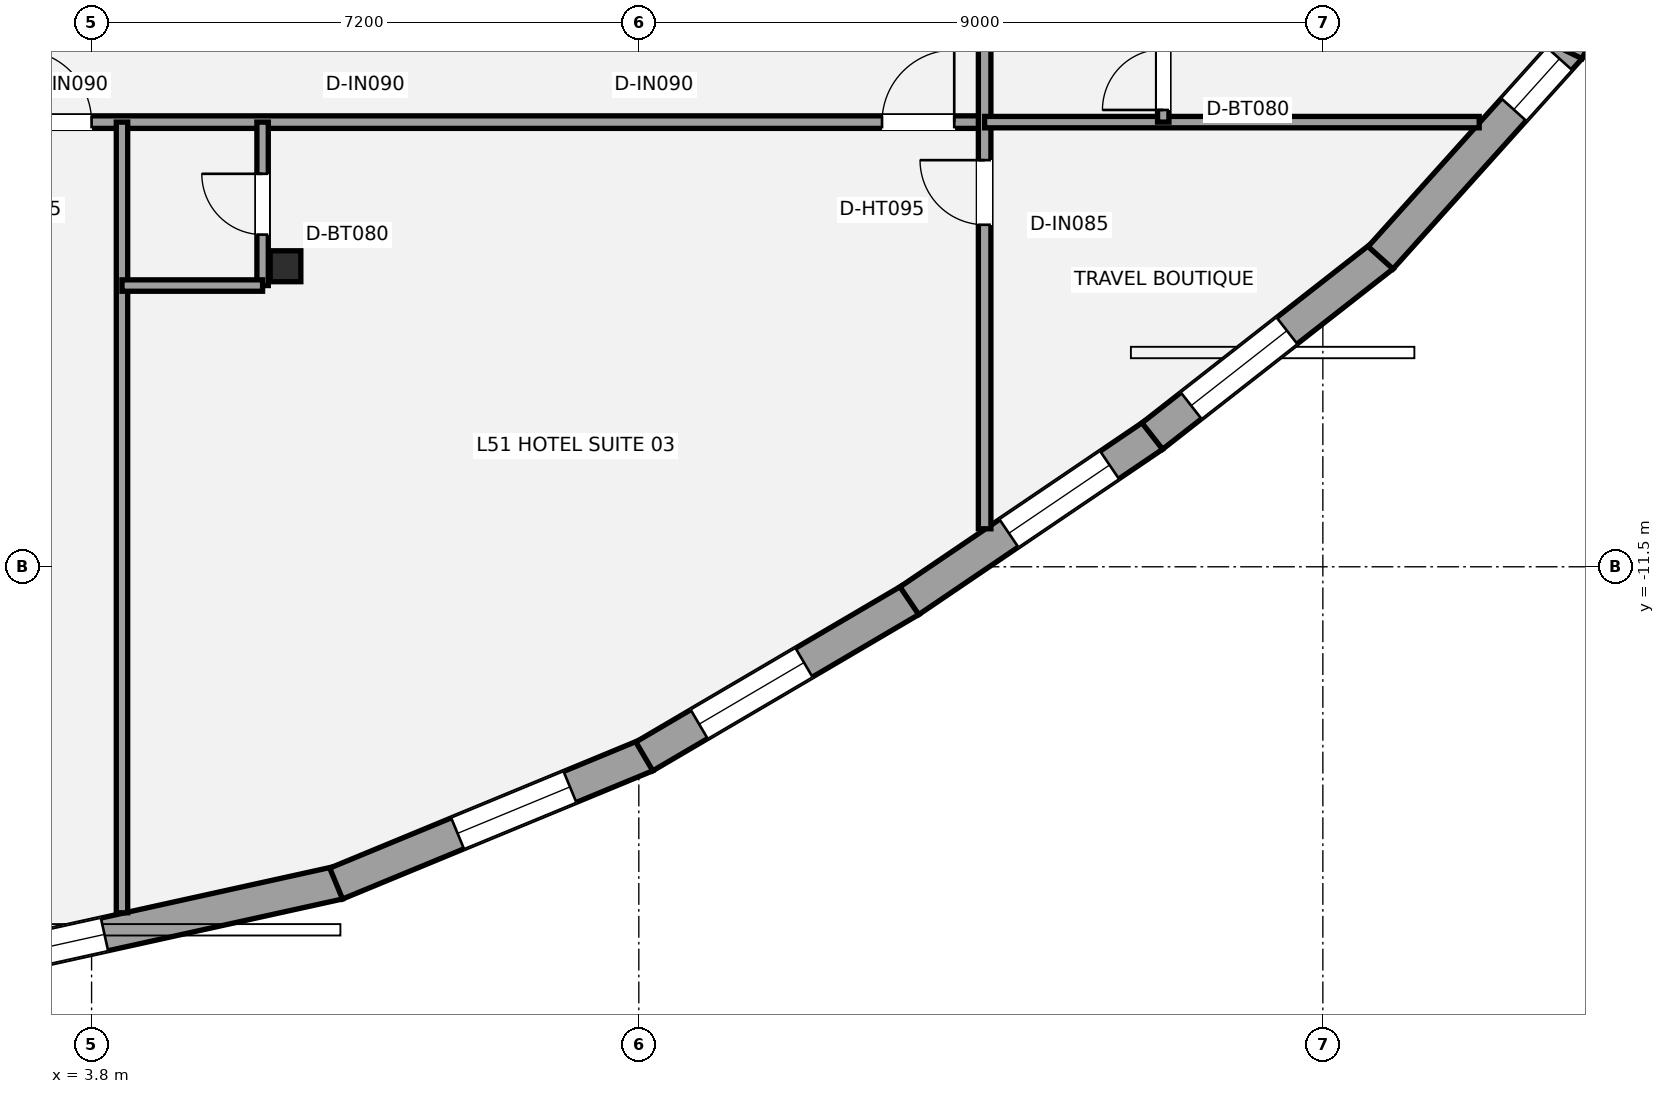
"""IFC4 building model, lengths in metres.
Left out: names, types, materials, properties, quantities, classifications, styles, units other than length and angle.
Written with IfcOpenShell. Run it as: python <this file> out.ifc"""

import sys

from ifc_helpers import new_model, si_unit, direction, frame, frame_2d, origin, origin_2d, place, context, subcontext, project, spatial, rectangle, i_section, extrude, element, fill, save


model = new_model("IFC4")
c1 = context("Model", 3, precision=1e-05, world=origin(), true_north=direction((0.0, 1.0)))
c2 = subcontext(c1, "Body", "Model", "MODEL_VIEW")
j1 = project(units=[si_unit("LENGTHUNIT", "METRE"), si_unit("PLANEANGLEUNIT", "RADIAN")], contexts=[c1])
p1 = place(None, origin())
s1 = spatial("IfcSite", under=j1, at=p1, CompositionType="ELEMENT")
p2 = place(p1, origin())
s2 = spatial("IfcBuilding", under=s1, at=p2, CompositionType="ELEMENT")
p3 = place(p2, frame((0.0, 0.0, 185.4)))
s3 = spatial("IfcBuildingStorey", under=s2, at=p3, CompositionType="ELEMENT", Elevation=185.4)
p4 = place(p3, frame((6.351, -7.546, 0.0), z_axis=(0.0, 0.0, 1.0), x_axis=(1.0, 0.0, 0.0)))
e1 = element("IfcColumn", 1, at=p4, inside=s3, PredefinedType="COLUMN", context=c2, shape_type="SweptSolid", body=[
    extrude(i_section(OverallWidth=0.404, OverallDepth=0.407, WebThickness=0.027, FlangeThickness=0.044, at=origin_2d()), origin(), (0.0, 0.0, 1.0), 3.2),
])
p5 = place(p3, frame((7.054, -15.656, 0.0), z_axis=(0.0, 0.0, 1.0), x_axis=(-0.976520281828, -0.215425484049, 0.0)))
e2 = element("IfcWall", 2, at=p5, inside=s3, PredefinedType="STANDARD", context=c2, shape_type="SweptSolid", body=[
    extrude(rectangle(XDim=4.759, YDim=0.44, at=frame_2d((2.379, 0.0))), origin(), (0.0, 0.0, 1.0), 2.315),
])
p6 = place(p5, frame((3.158, 0.0, 0.58)))
e3 = element("IfcOpeningElement", 3, at=p6, cuts=e2, PredefinedType="OPENING", context=c2, shape_type="SweptSolid", body=[
    extrude(rectangle(XDim=1.4, YDim=1.55, at=frame_2d((0.7, 0.775))), frame((0.0, 0.23, 0.0), z_axis=(0.0, -1.0, 0.0), x_axis=(1.0, 0.0, 0.0)), (0.0, 0.0, 1.0), 0.46),
])
p7 = place(p3, frame((11.1, -13.981, 0.0), z_axis=(0.0, 0.0, 1.0), x_axis=(-0.924224109839, -0.381850487486, 0.0)))
e4 = element("IfcWall", 4, at=p7, inside=s3, PredefinedType="STANDARD", context=c2, shape_type="SweptSolid", body=[
    extrude(rectangle(XDim=4.417, YDim=0.44, at=frame_2d((2.208, 0.0))), origin(), (0.0, 0.0, 1.0), 2.315),
])
p8 = place(p7, frame((1.088, 0.0, 0.58)))
e5 = element("IfcOpeningElement", 5, at=p8, cuts=e4, PredefinedType="OPENING", context=c2, shape_type="SweptSolid", body=[
    extrude(rectangle(XDim=1.6, YDim=1.55, at=frame_2d((0.8, 0.775))), frame((0.0, 0.23, 0.0), z_axis=(0.0, -1.0, 0.0), x_axis=(1.0, 0.0, 0.0)), (0.0, 0.0, 1.0), 0.46),
])
p9 = place(p3, frame((14.572, -11.939, 0.0), z_axis=(0.0, 0.0, 1.0), x_axis=(-0.862269598443, -0.506449542995, 0.0)))
e6 = element("IfcWall", 6, at=p9, inside=s3, PredefinedType="STANDARD", context=c2, shape_type="SweptSolid", body=[
    extrude(rectangle(XDim=4.059, YDim=0.44, at=frame_2d((2.029, 0.0))), origin(), (0.0, 0.0, 1.0), 2.315),
])
p10 = place(p9, frame((1.621, 0.0, 0.58)))
e7 = element("IfcOpeningElement", 7, at=p10, cuts=e6, PredefinedType="OPENING", context=c2, shape_type="SweptSolid", body=[
    extrude(rectangle(XDim=1.6, YDim=1.55, at=frame_2d((0.8, 0.775))), frame((0.0, 0.23, 0.0), z_axis=(0.0, -1.0, 0.0), x_axis=(1.0, 0.0, 0.0)), (0.0, 0.0, 1.0), 0.46),
])
p11 = place(p3, frame((17.768, -9.772, 0.0), z_axis=(0.0, 0.0, 1.0), x_axis=(-0.82774221662, -0.561108565988, 0.0)))
e8 = element("IfcWall", 8, at=p11, inside=s3, PredefinedType="STANDARD", context=c2, shape_type="SweptSolid", body=[
    extrude(rectangle(XDim=3.876, YDim=0.44, at=frame_2d((1.938, 0.0))), origin(), (0.0, 0.0, 1.0), 2.315),
])
p12 = place(p11, frame((0.694, 0.0, 0.58)))
e9 = element("IfcOpeningElement", 9, at=p12, cuts=e8, PredefinedType="OPENING", context=c2, shape_type="SweptSolid", body=[
    extrude(rectangle(XDim=1.6, YDim=1.55, at=frame_2d((0.8, 0.775))), frame((0.0, 0.23, 0.0), z_axis=(0.0, -1.0, 0.0), x_axis=(1.0, 0.0, 0.0)), (0.0, 0.0, 1.0), 0.46),
])
p13 = place(p3, frame((20.787, -7.408, 0.0), z_axis=(0.0, 0.0, 1.0), x_axis=(-0.787518383176, -0.616291161838, 0.0)))
e10 = element("IfcWall", 10, at=p13, inside=s3, PredefinedType="STANDARD", context=c2, shape_type="SweptSolid", body=[
    extrude(rectangle(XDim=3.85, YDim=0.44, at=frame_2d((1.925, 0.0))), origin(), (0.0, 0.0, 1.0), 2.315),
])
p14 = place(p13, frame((1.6, 0.0, 0.58)))
e11 = element("IfcOpeningElement", 11, at=p14, cuts=e10, PredefinedType="OPENING", context=c2, shape_type="SweptSolid", body=[
    extrude(rectangle(XDim=1.6, YDim=1.55, at=frame_2d((0.8, 0.775))), frame((0.0, 0.23, 0.0), z_axis=(0.0, -1.0, 0.0), x_axis=(1.0, 0.0, 0.0)), (0.0, 0.0, 1.0), 0.46),
])
p15 = place(p3, frame((23.247, -4.667, 0.0), z_axis=(0.0, 0.0, 1.0), x_axis=(-0.668547778607, -0.743669192396, 0.0)))
e12 = element("IfcWall", 12, at=p15, inside=s3, PredefinedType="STANDARD", context=c2, shape_type="SweptSolid", body=[
    extrude(rectangle(XDim=3.721, YDim=0.44, at=frame_2d((1.861, 0.0))), origin(), (0.0, 0.0, 1.0), 2.315),
])
p16 = place(p15, frame((0.2, 0.0, 0.58)))
e13 = element("IfcOpeningElement", 13, at=p16, cuts=e12, PredefinedType="OPENING", context=c2, shape_type="SweptSolid", body=[
    extrude(rectangle(XDim=0.9, YDim=1.35, at=frame_2d((0.45, 0.675))), frame((0.0, 0.23, 0.0), z_axis=(0.0, -1.0, 0.0), x_axis=(1.0, 0.0, 0.0)), (0.0, 0.0, 1.0), 0.46),
])
p17 = place(p3, frame((24.725, -1.569, 0.0), z_axis=(0.0, 0.0, 1.0), x_axis=(-0.43276286683, -0.90150779314, 0.0)))
e14 = element("IfcWall", 14, at=p17, inside=s3, PredefinedType="STANDARD", context=c2, shape_type="SweptSolid", body=[
    extrude(rectangle(XDim=3.494, YDim=0.44, at=frame_2d((1.747, 0.0))), origin(), (0.0, 0.0, 1.0), 2.315),
])
p18 = place(p17, frame((1.545, 0.0, 0.58)))
e15 = element("IfcOpeningElement", 15, at=p18, cuts=e14, PredefinedType="OPENING", context=c2, shape_type="SweptSolid", body=[
    extrude(rectangle(XDim=1.6, YDim=1.55, at=frame_2d((0.8, 0.775))), frame((0.0, 0.23, 0.0), z_axis=(0.0, -1.0, 0.0), x_axis=(1.0, 0.0, 0.0)), (0.0, 0.0, 1.0), 0.46),
])
p19 = place(p3, frame((-16.1, -5.65, 0.0), z_axis=(0.0, 0.0, 1.0), x_axis=(1.0, 0.0, 0.0)))
e16 = element("IfcWall", 16, at=p19, inside=s3, PredefinedType="PARTITIONING", context=c2, shape_type="SweptSolid", body=[
    extrude(rectangle(XDim=31.65, YDim=0.165, at=frame_2d((15.825, 0.0))), origin(), (0.0, 0.0, 1.0), 2.398),
])
p20 = place(p19, frame((8.95, 0.0, 0.0)))
e17 = element("IfcOpeningElement", 17, at=p20, cuts=e16, PredefinedType="OPENING", context=c2, shape_type="SweptSolid", body=[
    extrude(rectangle(XDim=0.95, YDim=2.15, at=frame_2d((0.475, 1.075))), frame((0.0, 0.093, 0.0), z_axis=(0.0, -1.0, 0.0), x_axis=(1.0, 0.0, 0.0)), (0.0, 0.0, 1.0), 0.185),
])
p21 = place(p19, frame((18.95, 0.0, 0.0)))
e18 = element("IfcOpeningElement", 18, at=p21, cuts=e16, PredefinedType="OPENING", context=c2, shape_type="SweptSolid", body=[
    extrude(rectangle(XDim=0.95, YDim=2.15, at=frame_2d((0.475, 1.075))), frame((0.0, 0.093, 0.0), z_axis=(0.0, -1.0, 0.0), x_axis=(1.0, 0.0, 0.0)), (0.0, 0.0, 1.0), 0.185),
])
p22 = place(p19, frame((30.3, 0.0, 0.0)))
e19 = element("IfcOpeningElement", 19, at=p22, cuts=e16, PredefinedType="OPENING", context=c2, shape_type="SweptSolid", body=[
    extrude(rectangle(XDim=0.95, YDim=2.15, at=frame_2d((0.475, 1.075))), frame((0.0, 0.093, 0.0), z_axis=(0.0, -1.0, 0.0), x_axis=(1.0, 0.0, 0.0)), (0.0, 0.0, 1.0), 0.185),
])
p23 = place(p3, frame((15.55, -11.0, 0.0), z_axis=(0.0, 0.0, 1.0), x_axis=(0.0, 1.0, 0.0)))
e20 = element("IfcWall", 20, at=p23, inside=s3, PredefinedType="PARTITIONING", context=c2, shape_type="SweptSolid", body=[
    extrude(rectangle(XDim=18.55, YDim=0.165, at=frame_2d((9.275, 0.0))), origin(), (0.0, 0.0, 1.0), 2.473),
])
p24 = place(p23, frame((4.0, 0.0, 0.0)))
e21 = element("IfcOpeningElement", 21, at=p24, cuts=e20, PredefinedType="OPENING", context=c2, shape_type="SweptSolid", body=[
    extrude(rectangle(XDim=0.85, YDim=2.1, at=frame_2d((0.425, 1.05))), frame((0.0, 0.093, 0.0), z_axis=(0.0, -1.0, 0.0), x_axis=(1.0, 0.0, 0.0)), (0.0, 0.0, 1.0), 0.185),
])
p25 = place(p23, frame((8.05, 0.0, 0.0)))
e22 = element("IfcOpeningElement", 22, at=p25, cuts=e20, PredefinedType="OPENING", context=c2, shape_type="SweptSolid", body=[
    extrude(rectangle(XDim=0.95, YDim=2.15, at=frame_2d((0.475, 1.075))), frame((0.0, 0.093, 0.0), z_axis=(0.0, -1.0, 0.0), x_axis=(1.0, 0.0, 0.0)), (0.0, 0.0, 1.0), 0.185),
])
p26 = place(p23, frame((12.45, 0.0, 0.0)))
e23 = element("IfcOpeningElement", 23, at=p26, cuts=e20, PredefinedType="OPENING", context=c2, shape_type="SweptSolid", body=[
    extrude(rectangle(XDim=0.95, YDim=2.15, at=frame_2d((0.475, 1.075))), frame((0.0, 0.093, 0.0), z_axis=(0.0, -1.0, 0.0), x_axis=(1.0, 0.0, 0.0)), (0.0, 0.0, 1.0), 0.185),
])
p27 = place(p23, frame((17.2, 0.0, 0.0)))
e24 = element("IfcOpeningElement", 24, at=p27, cuts=e20, PredefinedType="OPENING", context=c2, shape_type="SweptSolid", body=[
    extrude(rectangle(XDim=0.95, YDim=2.15, at=frame_2d((0.475, 1.075))), frame((0.0, 0.093, 0.0), z_axis=(0.0, -1.0, 0.0), x_axis=(1.0, 0.0, 0.0)), (0.0, 0.0, 1.0), 0.185),
])
p28 = place(p3, frame((15.55, -5.65, 0.0), z_axis=(0.0, 0.0, 1.0), x_axis=(1.0, 0.0, 0.0)))
e25 = element("IfcWall", 25, at=p28, inside=s3, PredefinedType="PLUMBINGWALL", context=c2, shape_type="SweptSolid", body=[
    extrude(rectangle(XDim=6.507, YDim=0.15, at=frame_2d((3.253, 0.0))), origin(), (0.0, 0.0, 1.0), 2.473),
])
p29 = place(p3, frame((4.2, -16.052, 0.0), z_axis=(0.0, 0.0, 1.0), x_axis=(0.0, 1.0, 0.0)))
e26 = element("IfcWall", 26, at=p29, inside=s3, PredefinedType="PLUMBINGWALL", context=c2, shape_type="SweptSolid", body=[
    extrude(rectangle(XDim=10.402, YDim=0.15, at=frame_2d((5.201, 0.0))), origin(), (0.0, 0.0, 1.0), 2.473),
])
p30 = place(p3, frame((6.05, -7.8, 0.0), z_axis=(0.0, 0.0, 1.0), x_axis=(0.0, 1.0, 0.0)))
e27 = element("IfcWall", 27, at=p30, inside=s3, PredefinedType="PLUMBINGWALL", context=c2, shape_type="SweptSolid", body=[
    extrude(rectangle(XDim=2.15, YDim=0.15, at=frame_2d((1.075, 0.0))), origin(), (0.0, 0.0, 1.0), 2.473),
])
p31 = place(p30, frame((0.67, 0.0, 0.0)))
e28 = element("IfcOpeningElement", 28, at=p31, cuts=e27, PredefinedType="OPENING", context=c2, shape_type="SweptSolid", body=[
    extrude(rectangle(XDim=0.8, YDim=2.1, at=frame_2d((0.4, 1.05))), frame((0.0, 0.085, 0.0), z_axis=(0.0, -1.0, 0.0), x_axis=(1.0, 0.0, 0.0)), (0.0, 0.0, 1.0), 0.17),
])
p32 = place(p3, frame((4.2, -7.8, 0.0), z_axis=(0.0, 0.0, 1.0), x_axis=(1.0, 0.0, 0.0)))
e29 = element("IfcWall", 29, at=p32, inside=s3, PredefinedType="PLUMBINGWALL", context=c2, shape_type="SweptSolid", body=[
    extrude(rectangle(XDim=1.85, YDim=0.15, at=frame_2d((0.925, 0.0))), origin(), (0.0, 0.0, 1.0), 3.02),
])
p33 = place(p3, frame((17.9, -5.65, 0.0), z_axis=(0.0, 0.0, 1.0), x_axis=(0.0, 1.0, 0.0)))
e30 = element("IfcWall", 30, at=p33, inside=s3, PredefinedType="PLUMBINGWALL", context=c2, shape_type="SweptSolid", body=[
    extrude(rectangle(XDim=2.15, YDim=0.15, at=frame_2d((1.075, 0.0))), origin(), (0.0, 0.0, 1.0), 2.473),
])
p34 = place(p33, frame((0.16, 0.0, 0.0)))
e31 = element("IfcOpeningElement", 31, at=p34, cuts=e30, PredefinedType="OPENING", context=c2, shape_type="SweptSolid", body=[
    extrude(rectangle(XDim=0.8, YDim=2.1, at=frame_2d((0.4, 1.05))), frame((0.0, 0.085, 0.0), z_axis=(0.0, -1.0, 0.0), x_axis=(1.0, 0.0, 0.0)), (0.0, 0.0, 1.0), 0.17),
])
p35 = place(p6, origin())
e32 = element("IfcWindow", 32, at=p35, inside=s3, PartitioningType="SINGLE_PANEL", PredefinedType="WINDOW", context=c2, shape_type="SweptSolid", body=[
    extrude(rectangle(XDim=1.4, YDim=1.55, at=frame_2d((0.7, 0.775))), frame((0.0, -0.01, 0.0), z_axis=(0.0, -1.0, 0.0), x_axis=(1.0, 0.0, 0.0)), (0.0, 0.0, 1.0), 0.06),
])
fill(e3, e32)
p36 = place(p8, origin())
e33 = element("IfcWindow", 33, at=p36, inside=s3, PartitioningType="SINGLE_PANEL", PredefinedType="WINDOW", context=c2, shape_type="SweptSolid", body=[
    extrude(rectangle(XDim=1.6, YDim=1.55, at=frame_2d((0.8, 0.775))), frame((0.0, -0.01, 0.0), z_axis=(0.0, -1.0, 0.0), x_axis=(1.0, 0.0, 0.0)), (0.0, 0.0, 1.0), 0.06),
])
fill(e5, e33)
p37 = place(p10, origin())
e34 = element("IfcWindow", 34, at=p37, inside=s3, PartitioningType="SINGLE_PANEL", PredefinedType="WINDOW", context=c2, shape_type="SweptSolid", body=[
    extrude(rectangle(XDim=1.6, YDim=1.55, at=frame_2d((0.8, 0.775))), frame((0.0, -0.01, 0.0), z_axis=(0.0, -1.0, 0.0), x_axis=(1.0, 0.0, 0.0)), (0.0, 0.0, 1.0), 0.06),
])
fill(e7, e34)
p38 = place(p12, origin())
e35 = element("IfcWindow", 35, at=p38, inside=s3, PartitioningType="SINGLE_PANEL", PredefinedType="WINDOW", context=c2, shape_type="SweptSolid", body=[
    extrude(rectangle(XDim=1.6, YDim=1.55, at=frame_2d((0.8, 0.775))), frame((0.0, -0.01, 0.0), z_axis=(0.0, -1.0, 0.0), x_axis=(1.0, 0.0, 0.0)), (0.0, 0.0, 1.0), 0.06),
])
fill(e9, e35)
p39 = place(p14, origin())
e36 = element("IfcWindow", 36, at=p39, inside=s3, PartitioningType="SINGLE_PANEL", PredefinedType="WINDOW", context=c2, shape_type="SweptSolid", body=[
    extrude(rectangle(XDim=1.6, YDim=1.55, at=frame_2d((0.8, 0.775))), frame((0.0, -0.01, 0.0), z_axis=(0.0, -1.0, 0.0), x_axis=(1.0, 0.0, 0.0)), (0.0, 0.0, 1.0), 0.06),
])
fill(e11, e36)
p40 = place(p16, origin())
e37 = element("IfcWindow", 37, at=p40, inside=s3, PartitioningType="SINGLE_PANEL", PredefinedType="WINDOW", context=c2, shape_type="SweptSolid", body=[
    extrude(rectangle(XDim=0.9, YDim=1.35, at=frame_2d((0.45, 0.675))), frame((0.0, -0.01, 0.0), z_axis=(0.0, -1.0, 0.0), x_axis=(1.0, 0.0, 0.0)), (0.0, 0.0, 1.0), 0.06),
])
fill(e13, e37)
p41 = place(p24, origin())
e38 = element("IfcDoor", 38, at=p41, inside=s3, OperationType="SINGLE_SWING_RIGHT", PredefinedType="DOOR", context=c2, shape_type="SweptSolid", body=[
    extrude(rectangle(XDim=0.85, YDim=2.1, at=frame_2d((0.425, 1.05))), frame((0.0, 0.025, 0.0), z_axis=(0.0, -1.0, 0.0), x_axis=(1.0, 0.0, 0.0)), (0.0, 0.0, 1.0), 0.05),
])
fill(e21, e38)
p42 = place(p21, origin())
e39 = element("IfcDoor", 39, at=p42, inside=s3, OperationType="SINGLE_SWING_LEFT", PredefinedType="DOOR", context=c2, shape_type="SweptSolid", body=[
    extrude(rectangle(XDim=0.95, YDim=2.15, at=frame_2d((0.475, 1.075))), frame((0.0, 0.025, 0.0), z_axis=(0.0, -1.0, 0.0), x_axis=(1.0, 0.0, 0.0)), (0.0, 0.0, 1.0), 0.05),
])
fill(e18, e39)
p43 = place(p22, origin())
e40 = element("IfcDoor", 40, at=p43, inside=s3, OperationType="SINGLE_SWING_RIGHT", PredefinedType="DOOR", context=c2, shape_type="SweptSolid", body=[
    extrude(rectangle(XDim=0.95, YDim=2.15, at=frame_2d((0.475, 1.075))), frame((0.0, 0.025, 0.0), z_axis=(0.0, -1.0, 0.0), x_axis=(1.0, 0.0, 0.0)), (0.0, 0.0, 1.0), 0.05),
])
fill(e19, e40)
p44 = place(p31, origin())
e41 = element("IfcDoor", 41, at=p44, inside=s3, OperationType="SINGLE_SWING_RIGHT", PredefinedType="DOOR", context=c2, shape_type="SweptSolid", body=[
    extrude(rectangle(XDim=0.8, YDim=2.1, at=frame_2d((0.4, 1.05))), frame((0.0, 0.025, 0.0), z_axis=(0.0, -1.0, 0.0), x_axis=(1.0, 0.0, 0.0)), (0.0, 0.0, 1.0), 0.05),
])
fill(e28, e41)
p45 = place(p34, origin())
e42 = element("IfcDoor", 42, at=p45, inside=s3, OperationType="SINGLE_SWING_LEFT", PredefinedType="DOOR", context=c2, shape_type="SweptSolid", body=[
    extrude(rectangle(XDim=0.8, YDim=2.1, at=frame_2d((0.4, 1.05))), frame((0.0, 0.025, 0.0), z_axis=(0.0, -1.0, 0.0), x_axis=(1.0, 0.0, 0.0)), (0.0, 0.0, 1.0), 0.05),
])
fill(e31, e42)
save(model, sys.argv[1])
